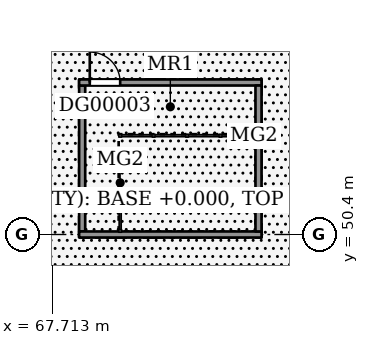
"""IFC4 building model, lengths in metres.
Left out: names, types, materials, properties, quantities, classifications, styles, units other than length and angle.
Written with IfcOpenShell. Run it as: python <this file> out.ifc"""

import sys

from ifc_helpers import new_model, si_unit, direction, frame, frame_2d, origin, place, context, subcontext, project, spatial, rectangle, extrude, element, fill, save


model = new_model("IFC4")
c1 = context("Model", 3, precision=1e-05, world=origin(), true_north=direction((0.0, 1.0)))
c2 = subcontext(c1, "Body", "Model", "MODEL_VIEW")
j1 = project(units=[si_unit("LENGTHUNIT", "METRE"), si_unit("PLANEANGLEUNIT", "RADIAN")], contexts=[c1])
p1 = place(None, origin())
s1 = spatial("IfcSite", under=j1, at=p1, CompositionType="ELEMENT")
p2 = place(p1, origin())
s2 = spatial("IfcBuilding", under=s1, at=p2, CompositionType="ELEMENT")
p3 = place(p2, origin())
s3 = spatial("IfcBuildingStorey", under=s2, at=p3, CompositionType="ELEMENT", Elevation=0.0)
p4 = place(p3, frame((68.7, 50.5, 0.0), z_axis=(0.0, 0.0, 1.0), x_axis=(0.0, 1.0, 0.0)))
e1 = element("IfcWall", 1, at=p4, inside=s3, PredefinedType="SOLIDWALL", context=c2, shape_type="SweptSolid", body=[
    extrude(rectangle(XDim=4.8, YDim=0.2, at=frame_2d((2.4, 0.0))), origin(), (0.0, 0.0, 1.0), 3.6),
])
p5 = place(p3, frame((68.6, 50.4, 0.0), z_axis=(0.0, 0.0, 1.0), x_axis=(1.0, 0.0, 0.0)))
e2 = element("IfcWall", 2, at=p5, inside=s3, PredefinedType="SOLIDWALL", context=c2, shape_type="SweptSolid", body=[
    extrude(rectangle(XDim=6.0, YDim=0.2, at=frame_2d((3.0, 0.0))), origin(), (0.0, 0.0, 1.0), 3.6),
])
p6 = place(p3, frame((68.6, 55.4, 0.0), z_axis=(0.0, 0.0, 1.0), x_axis=(1.0, 0.0, 0.0)))
e3 = element("IfcWall", 3, at=p6, inside=s3, PredefinedType="SOLIDWALL", context=c2, shape_type="SweptSolid", body=[
    extrude(rectangle(XDim=6.0, YDim=0.2, at=frame_2d((3.0, 0.0))), origin(), (0.0, 0.0, 1.0), 3.6),
])
p7 = place(p6, frame((0.35, 0.0, 0.0)))
e4 = element("IfcOpeningElement", 4, at=p7, cuts=e3, PredefinedType="OPENING", context=c2, shape_type="SweptSolid", body=[
    extrude(rectangle(XDim=1.0, YDim=2.1, at=frame_2d((0.5, 1.05))), frame((0.0, 0.11, 0.0), z_axis=(0.0, -1.0, 0.0), x_axis=(1.0, 0.0, 0.0)), (0.0, 0.0, 1.0), 0.22),
])
p8 = place(p3, frame((74.5, 50.5, 0.0), z_axis=(0.0, 0.0, 1.0), x_axis=(0.0, 1.0, 0.0)))
e5 = element("IfcWall", 5, at=p8, inside=s3, PredefinedType="SOLIDWALL", context=c2, shape_type="SweptSolid", body=[
    extrude(rectangle(XDim=4.8, YDim=0.2, at=frame_2d((2.4, 0.0))), origin(), (0.0, 0.0, 1.0), 3.6),
])
p9 = place(p7, origin())
e6 = element("IfcDoor", 6, at=p9, inside=s3, OperationType="SINGLE_SWING_LEFT", PredefinedType="DOOR", context=c2, shape_type="SweptSolid", body=[
    extrude(rectangle(XDim=1.0, YDim=2.1, at=frame_2d((0.5, 1.05))), frame((0.0, 0.025, 0.0), z_axis=(0.0, -1.0, 0.0), x_axis=(1.0, 0.0, 0.0)), (0.0, 0.0, 1.0), 0.05),
])
fill(e4, e6)
save(model, sys.argv[1])
